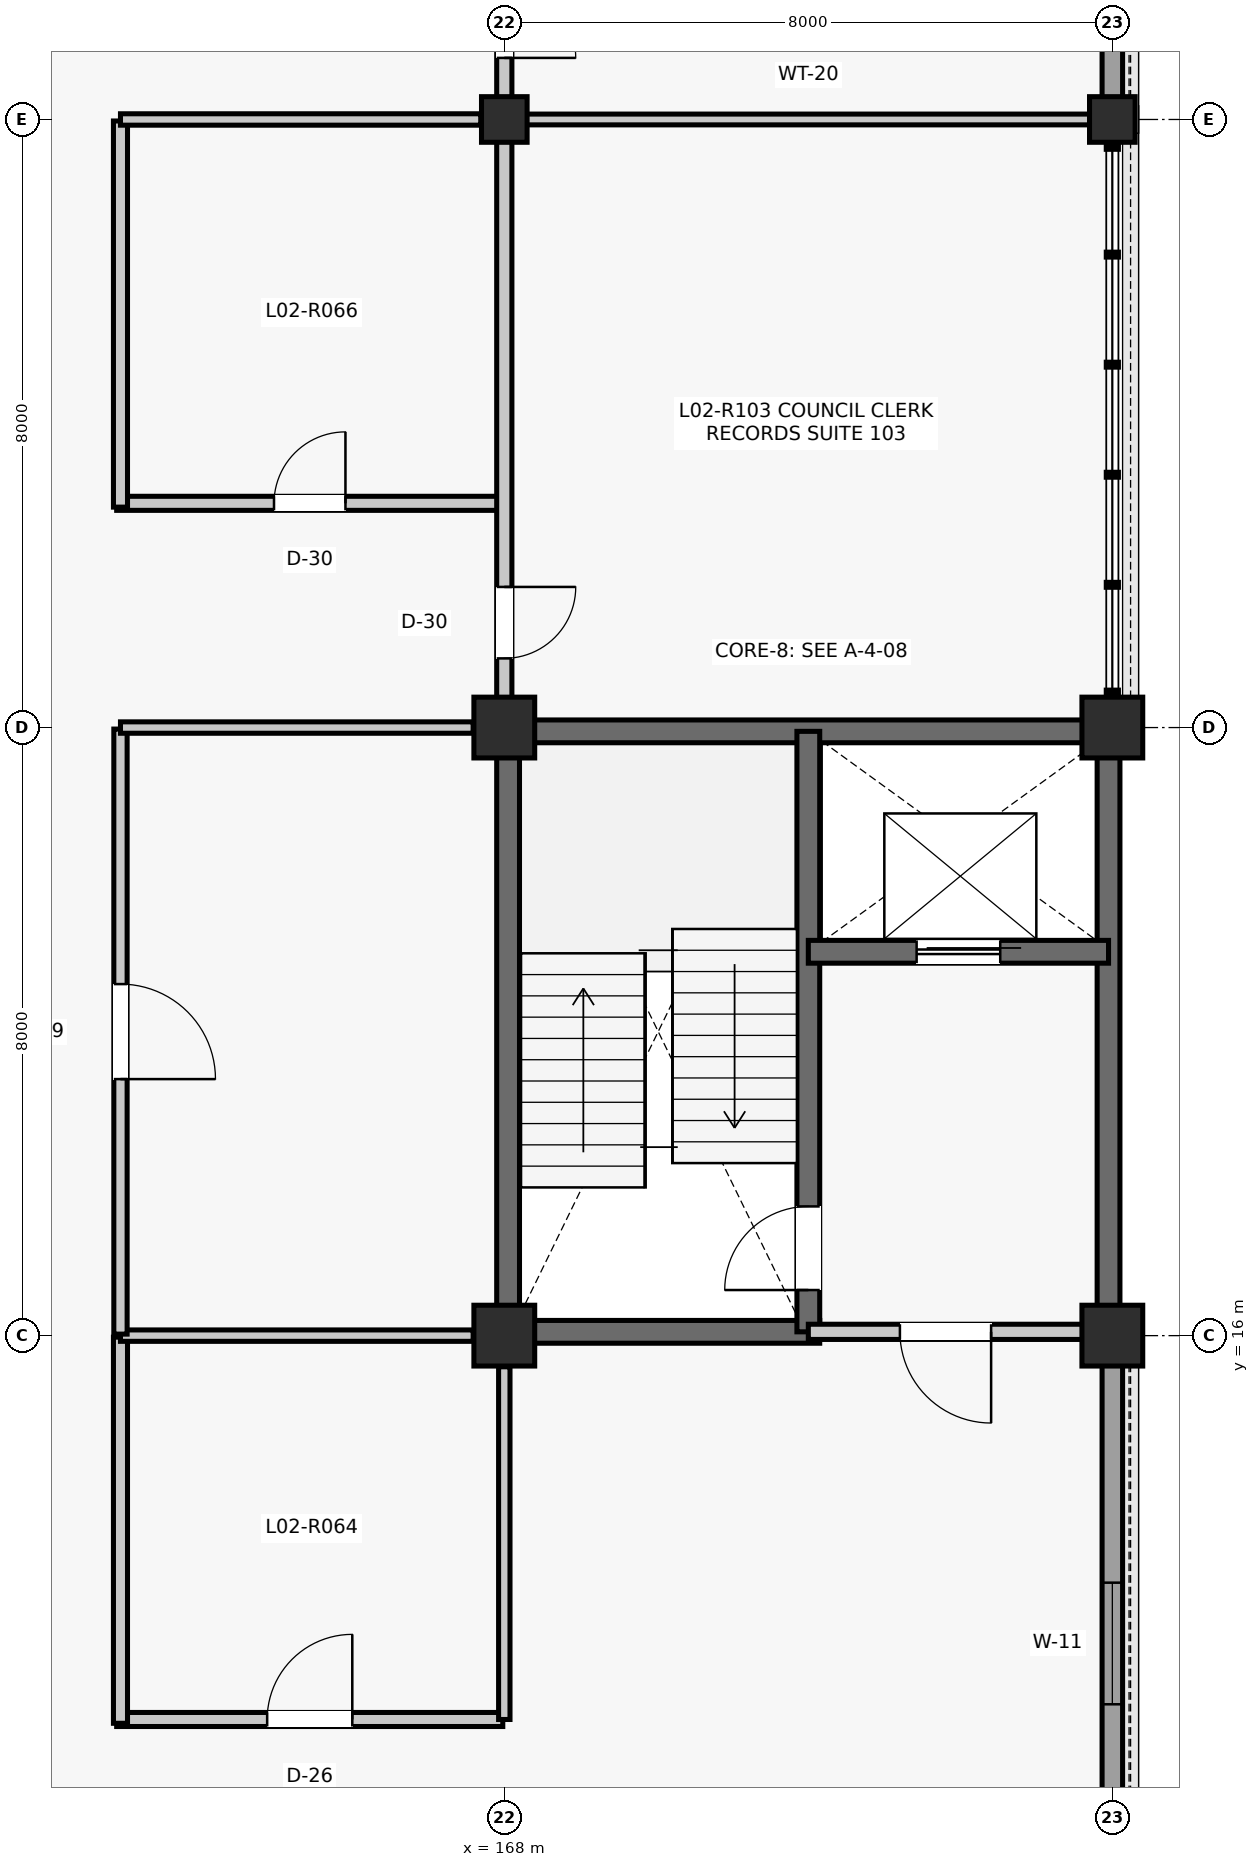
"""IFC4 building model, lengths in metres.
Left out: names, types, materials, properties, quantities, classifications, styles, units other than length and angle.
Written with IfcOpenShell. Run it as: python <this file> out.ifc"""

import sys

from ifc_helpers import new_model, si_unit, direction, frame, frame_2d, origin, origin_2d, place, context, subcontext, project, spatial, rectangle, extrude, element, fill, save


model = new_model("IFC4")
c1 = context("Model", 3, precision=1e-05, world=origin(), true_north=direction((0.0, 1.0)))
c2 = subcontext(c1, "Body", "Model", "MODEL_VIEW")
j1 = project(units=[si_unit("LENGTHUNIT", "METRE"), si_unit("PLANEANGLEUNIT", "RADIAN")], contexts=[c1])
p1 = place(None, origin())
s1 = spatial("IfcSite", under=j1, at=p1, CompositionType="ELEMENT")
p2 = place(p1, origin())
s2 = spatial("IfcBuilding", under=s1, at=p2, CompositionType="ELEMENT")
p3 = place(p2, frame((0.0, 0.0, 9.9)))
s3 = spatial("IfcBuildingStorey", under=s2, at=p3, CompositionType="ELEMENT", Elevation=9.9)
for number, where, z_axis, x_axis in (
    (1, (168.0, 16.0, 0.0), (0.0, 0.0, 1.0), (1.0, 0.0, 0.0)),
    (2, (168.0, 24.0, 0.0), (0.0, 0.0, 1.0), (1.0, 0.0, 0.0)),
):
    element("IfcColumn", number, at=place(p3, frame(where, z_axis=z_axis, x_axis=x_axis)), inside=s3, PredefinedType="COLUMN", context=c2, shape_type="SweptSolid", body=[
        extrude(rectangle(XDim=0.8, YDim=0.8, at=origin_2d()), origin(), (0.0, 0.0, 1.0), 3.96),
    ])
p4 = place(p3, frame((168.0, 32.0, 0.0), z_axis=(0.0, 0.0, 1.0), x_axis=(1.0, 0.0, 0.0)))
e3 = element("IfcColumn", 3, at=p4, inside=s3, PredefinedType="COLUMN", context=c2, shape_type="SweptSolid", body=[
    extrude(rectangle(XDim=0.6, YDim=0.6, at=origin_2d()), origin(), (0.0, 0.0, 1.0), 3.96),
])
for number, where, z_axis, x_axis in (
    (4, (176.0, 16.0, 0.0), (0.0, 0.0, 1.0), (1.0, 0.0, 0.0)),
    (5, (176.0, 24.0, 0.0), (0.0, 0.0, 1.0), (1.0, 0.0, 0.0)),
):
    element("IfcColumn", number, at=place(p3, frame(where, z_axis=z_axis, x_axis=x_axis)), inside=s3, PredefinedType="COLUMN", context=c2, shape_type="SweptSolid", body=[
        extrude(rectangle(XDim=0.8, YDim=0.8, at=origin_2d()), origin(), (0.0, 0.0, 1.0), 3.96),
    ])
p5 = place(p3, frame((176.0, 32.0, 0.0), z_axis=(0.0, 0.0, 1.0), x_axis=(1.0, 0.0, 0.0)))
e6 = element("IfcColumn", 6, at=p5, inside=s3, PredefinedType="COLUMN", context=c2, shape_type="SweptSolid", body=[
    extrude(rectangle(XDim=0.6, YDim=0.6, at=origin_2d()), origin(), (0.0, 0.0, 1.0), 3.96),
])
p6 = place(p3, frame((176.0, 8.285, 0.0), z_axis=(0.0, 0.0, 1.0), x_axis=(0.0, 1.0, 0.0)))
e7 = element("IfcWall", 7, at=p6, inside=s3, PredefinedType="SOLIDWALL", context=c2, shape_type="SweptSolid", body=[
    extrude(rectangle(XDim=7.33, YDim=0.27, at=frame_2d((3.665, 0.0))), origin(), (0.0, 0.0, 1.0), 3.344),
])
p7 = place(p6, frame((2.865, 0.0, 0.9)))
e8 = element("IfcOpeningElement", 8, at=p7, cuts=e7, PredefinedType="OPENING", context=c2, shape_type="SweptSolid", body=[
    extrude(rectangle(XDim=1.6, YDim=2.0, at=frame_2d((0.8, 1.0))), frame((0.0, 0.145, 0.0), z_axis=(0.0, -1.0, 0.0), x_axis=(1.0, 0.0, 0.0)), (0.0, 0.0, 1.0), 0.29),
])
p8 = place(p3, frame((176.0, 32.285, 0.0), z_axis=(0.0, 0.0, 1.0), x_axis=(0.0, 1.0, 0.0)))
e9 = element("IfcWall", 9, at=p8, inside=s3, PredefinedType="SOLIDWALL", context=c2, shape_type="SweptSolid", body=[
    extrude(rectangle(XDim=7.43, YDim=0.27, at=frame_2d((3.715, 0.0))), origin(), (0.0, 0.0, 1.0), 3.28),
])
p9 = place(p8, frame((3.115, 0.0, 0.9)))
e10 = element("IfcOpeningElement", 10, at=p9, cuts=e9, PredefinedType="OPENING", context=c2, shape_type="SweptSolid", body=[
    extrude(rectangle(XDim=1.2, YDim=1.8, at=frame_2d((0.6, 0.9))), frame((0.0, 0.145, 0.0), z_axis=(0.0, -1.0, 0.0), x_axis=(1.0, 0.0, 0.0)), (0.0, 0.0, 1.0), 0.29),
])
for number, where, z_axis, x_axis in (
    (11, (168.05, 16.29, 0.0), (0.0, 0.0, 1.0), (0.0, 1.0, 0.0)),
    (12, (168.29, 23.95, 0.0), (0.0, 0.0, 1.0), (1.0, 0.0, 0.0)),
    (13, (175.95, 16.29, 0.0), (0.0, 0.0, 1.0), (0.0, 1.0, 0.0)),
):
    element("IfcWall", number, at=place(p3, frame(where, z_axis=z_axis, x_axis=x_axis)), inside=s3, PredefinedType="SHEAR", context=c2, shape_type="SweptSolid", body=[
        extrude(rectangle(XDim=7.42, YDim=0.3, at=frame_2d((3.71, 0.0))), origin(), (0.0, 0.0, 1.0), 3.705),
    ])
p10 = place(p3, frame((168.29, 16.05, 0.0), z_axis=(0.0, 0.0, 1.0), x_axis=(1.0, 0.0, 0.0)))
e14 = element("IfcWall", 14, at=p10, inside=s3, PredefinedType="SHEAR", context=c2, shape_type="SweptSolid", body=[
    extrude(rectangle(XDim=3.86, YDim=0.3, at=frame_2d((1.93, 0.0))), origin(), (0.0, 0.0, 1.0), 3.705),
])
p11 = place(p3, frame((172.0, 16.05, 0.0), z_axis=(0.0, 0.0, 1.0), x_axis=(0.0, 1.0, 0.0)))
e15 = element("IfcWall", 15, at=p11, inside=s3, PredefinedType="SHEAR", context=c2, shape_type="SweptSolid", body=[
    extrude(rectangle(XDim=7.9, YDim=0.3, at=frame_2d((3.95, 0.0))), origin(), (0.0, 0.0, 1.0), 3.705),
])
p12 = place(p11, frame((0.55, 0.0, 0.0)))
e16 = element("IfcOpeningElement", 16, at=p12, cuts=e15, PredefinedType="OPENING", context=c2, shape_type="SweptSolid", body=[
    extrude(rectangle(XDim=1.1, YDim=2.15, at=frame_2d((0.55, 1.075))), frame((0.0, 0.16, 0.0), z_axis=(0.0, -1.0, 0.0), x_axis=(1.0, 0.0, 0.0)), (0.0, 0.0, 1.0), 0.32),
])
p13 = place(p3, frame((172.0, 21.05, 0.0), z_axis=(0.0, 0.0, 1.0), x_axis=(1.0, 0.0, 0.0)))
e17 = element("IfcWall", 17, at=p13, inside=s3, PredefinedType="SHEAR", context=c2, shape_type="SweptSolid", body=[
    extrude(rectangle(XDim=3.95, YDim=0.3, at=frame_2d((1.975, 0.0))), origin(), (0.0, 0.0, 1.0), 3.705),
])
p14 = place(p13, frame((1.425, 0.0, 0.0)))
e18 = element("IfcOpeningElement", 18, at=p14, cuts=e17, PredefinedType="OPENING", context=c2, shape_type="SweptSolid", body=[
    extrude(rectangle(XDim=1.1, YDim=2.2, at=frame_2d((0.55, 1.1))), frame((0.0, 0.16, 0.0), z_axis=(0.0, -1.0, 0.0), x_axis=(1.0, 0.0, 0.0)), (0.0, 0.0, 1.0), 0.32),
])
p15 = place(p3, frame((172.0, 16.05, 0.0), z_axis=(0.0, 0.0, 1.0), x_axis=(1.0, 0.0, 0.0)))
e19 = element("IfcWall", 19, at=p15, inside=s3, PredefinedType="PARTITIONING", context=c2, shape_type="SweptSolid", body=[
    extrude(rectangle(XDim=3.61, YDim=0.2, at=frame_2d((1.805, 0.0))), origin(), (0.0, 0.0, 1.0), 3.151),
])
p16 = place(p15, frame((1.205, 0.0, 0.0)))
e20 = element("IfcOpeningElement", 20, at=p16, cuts=e19, PredefinedType="OPENING", context=c2, shape_type="SweptSolid", body=[
    extrude(rectangle(XDim=1.2, YDim=2.15, at=frame_2d((0.6, 1.075))), frame((0.0, 0.11, 0.0), z_axis=(0.0, -1.0, 0.0), x_axis=(1.0, 0.0, 0.0)), (0.0, 0.0, 1.0), 0.22),
])
p17 = place(p3, frame((162.9, 10.95, 0.0), z_axis=(0.0, 0.0, 1.0), x_axis=(1.0, 0.0, 0.0)))
e21 = element("IfcWall", 21, at=p17, inside=s3, PredefinedType="PARTITIONING", context=c2, shape_type="SweptSolid", body=[
    extrude(rectangle(XDim=5.08, YDim=0.185, at=frame_2d((2.54, 0.0))), origin(), (0.0, 0.0, 1.0), 3.151),
])
p18 = place(p17, frame((1.98, 0.0, 0.0)))
e22 = element("IfcOpeningElement", 22, at=p18, cuts=e21, PredefinedType="OPENING", context=c2, shape_type="SweptSolid", body=[
    extrude(rectangle(XDim=1.12, YDim=2.22, at=frame_2d((0.56, 1.11))), frame((0.0, 0.103, 0.0), z_axis=(0.0, -1.0, 0.0), x_axis=(1.0, 0.0, 0.0)), (0.0, 0.0, 1.0), 0.205),
])
p19 = place(p3, frame((162.95, 10.9, 0.0), z_axis=(0.0, 0.0, 1.0), x_axis=(0.0, 1.0, 0.0)))
e23 = element("IfcWall", 23, at=p19, inside=s3, PredefinedType="PARTITIONING", context=c2, shape_type="SweptSolid", body=[
    extrude(rectangle(XDim=5.08, YDim=0.185, at=frame_2d((2.54, 0.0))), origin(), (0.0, 0.0, 1.0), 3.141),
])
p20 = place(p3, frame((162.95, 16.0, 0.0), z_axis=(0.0, 0.0, 1.0), x_axis=(1.0, 0.0, 0.0)))
e24 = element("IfcWall", 24, at=p20, inside=s3, PredefinedType="PARTITIONING", context=c2, shape_type="SweptSolid", body=[
    extrude(rectangle(XDim=4.64, YDim=0.15, at=frame_2d((2.32, 0.0))), origin(), (0.0, 0.0, 1.0), 3.141),
])
p21 = place(p3, frame((168.0, 10.95, 0.0), z_axis=(0.0, 0.0, 1.0), x_axis=(0.0, 1.0, 0.0)))
e25 = element("IfcWall", 25, at=p21, inside=s3, PredefinedType="PARTITIONING", context=c2, shape_type="SweptSolid", body=[
    extrude(rectangle(XDim=4.64, YDim=0.15, at=frame_2d((2.32, 0.0))), origin(), (0.0, 0.0, 1.0), 3.151),
])
p22 = place(p3, frame((162.95, 16.02, 0.0), z_axis=(0.0, 0.0, 1.0), x_axis=(0.0, 1.0, 0.0)))
e26 = element("IfcWall", 26, at=p22, inside=s3, PredefinedType="PARTITIONING", context=c2, shape_type="SweptSolid", body=[
    extrude(rectangle(XDim=7.96, YDim=0.175, at=frame_2d((3.98, 0.0))), origin(), (0.0, 0.0, 1.0), 3.141),
])
p23 = place(p22, frame((3.355, 0.0, 0.0)))
e27 = element("IfcOpeningElement", 27, at=p23, cuts=e26, PredefinedType="OPENING", context=c2, shape_type="SweptSolid", body=[
    extrude(rectangle(XDim=1.25, YDim=2.18, at=frame_2d((0.625, 1.09))), frame((0.0, 0.097, 0.0), z_axis=(0.0, -1.0, 0.0), x_axis=(1.0, 0.0, 0.0)), (0.0, 0.0, 1.0), 0.195),
])
p24 = place(p3, frame((162.95, 24.0, 0.0), z_axis=(0.0, 0.0, 1.0), x_axis=(1.0, 0.0, 0.0)))
e28 = element("IfcWall", 28, at=p24, inside=s3, PredefinedType="PARTITIONING", context=c2, shape_type="SweptSolid", body=[
    extrude(rectangle(XDim=4.64, YDim=0.15, at=frame_2d((2.32, 0.0))), origin(), (0.0, 0.0, 1.0), 3.151),
])
p25 = place(p3, frame((162.9, 26.95, 0.0), z_axis=(0.0, 0.0, 1.0), x_axis=(1.0, 0.0, 0.0)))
e29 = element("IfcWall", 29, at=p25, inside=s3, PredefinedType="PARTITIONING", context=c2, shape_type="SweptSolid", body=[
    extrude(rectangle(XDim=5.08, YDim=0.185, at=frame_2d((2.54, 0.0))), origin(), (0.0, 0.0, 1.0), 3.157),
])
p26 = place(p25, frame((2.07, 0.0, 0.0)))
e30 = element("IfcOpeningElement", 30, at=p26, cuts=e29, PredefinedType="OPENING", context=c2, shape_type="SweptSolid", body=[
    extrude(rectangle(XDim=0.94, YDim=2.12, at=frame_2d((0.47, 1.06))), frame((0.0, 0.103, 0.0), z_axis=(0.0, -1.0, 0.0), x_axis=(1.0, 0.0, 0.0)), (0.0, 0.0, 1.0), 0.205),
])
p27 = place(p3, frame((162.95, 26.9, 0.0), z_axis=(0.0, 0.0, 1.0), x_axis=(0.0, 1.0, 0.0)))
e31 = element("IfcWall", 31, at=p27, inside=s3, PredefinedType="PARTITIONING", context=c2, shape_type="SweptSolid", body=[
    extrude(rectangle(XDim=5.08, YDim=0.185, at=frame_2d((2.54, 0.0))), origin(), (0.0, 0.0, 1.0), 3.082),
])
p28 = place(p3, frame((162.95, 32.0, 0.0), z_axis=(0.0, 0.0, 1.0), x_axis=(1.0, 0.0, 0.0)))
e32 = element("IfcWall", 32, at=p28, inside=s3, PredefinedType="PARTITIONING", context=c2, shape_type="SweptSolid", body=[
    extrude(rectangle(XDim=4.74, YDim=0.15, at=frame_2d((2.37, 0.0))), origin(), (0.0, 0.0, 1.0), 3.082),
])
p29 = place(p3, frame((168.0, 24.39, 0.0), z_axis=(0.0, 0.0, 1.0), x_axis=(0.0, 1.0, 0.0)))
e33 = element("IfcWall", 33, at=p29, inside=s3, PredefinedType="PARTITIONING", context=c2, shape_type="SweptSolid", body=[
    extrude(rectangle(XDim=7.32, YDim=0.2, at=frame_2d((3.66, 0.0))), origin(), (0.0, 0.0, 1.0), 3.157),
])
p30 = place(p29, frame((0.52, 0.0, 0.0)))
e34 = element("IfcOpeningElement", 34, at=p30, cuts=e33, PredefinedType="OPENING", context=c2, shape_type="SweptSolid", body=[
    extrude(rectangle(XDim=0.94, YDim=2.12, at=frame_2d((0.47, 1.06))), frame((0.0, 0.11, 0.0), z_axis=(0.0, -1.0, 0.0), x_axis=(1.0, 0.0, 0.0)), (0.0, 0.0, 1.0), 0.22),
])
p31 = place(p3, frame((168.0, 32.29, 0.0), z_axis=(0.0, 0.0, 1.0), x_axis=(0.0, 1.0, 0.0)))
e35 = element("IfcWall", 35, at=p31, inside=s3, PredefinedType="PARTITIONING", context=c2, shape_type="SweptSolid", body=[
    extrude(rectangle(XDim=7.42, YDim=0.2, at=frame_2d((3.71, 0.0))), origin(), (0.0, 0.0, 1.0), 3.227),
])
p32 = place(p31, frame((0.52, 0.0, 0.0)))
e36 = element("IfcOpeningElement", 36, at=p32, cuts=e35, PredefinedType="OPENING", context=c2, shape_type="SweptSolid", body=[
    extrude(rectangle(XDim=0.94, YDim=2.12, at=frame_2d((0.47, 1.06))), frame((0.0, 0.11, 0.0), z_axis=(0.0, -1.0, 0.0), x_axis=(1.0, 0.0, 0.0)), (0.0, 0.0, 1.0), 0.22),
])
p33 = place(p3, frame((168.29, 32.0, 0.0), z_axis=(0.0, 0.0, 1.0), x_axis=(1.0, 0.0, 0.0)))
e37 = element("IfcWall", 37, at=p33, inside=s3, PredefinedType="PARTITIONING", context=c2, shape_type="SweptSolid", body=[
    extrude(rectangle(XDim=7.42, YDim=0.142, at=frame_2d((3.71, 0.0))), origin(), (0.0, 0.0, 1.0), 3.157),
])
p34 = place(p7, origin())
e38 = element("IfcWindow", 38, at=p34, inside=s3, PartitioningType="SINGLE_PANEL", PredefinedType="WINDOW", context=c2, shape_type="SweptSolid", body=[
    extrude(rectangle(XDim=1.6, YDim=2.0, at=frame_2d((0.8, 1.0))), frame((0.0, 0.03, 0.0), z_axis=(0.0, -1.0, 0.0), x_axis=(1.0, 0.0, 0.0)), (0.0, 0.0, 1.0), 0.06),
])
fill(e8, e38)
p35 = place(p12, origin())
e39 = element("IfcDoor", 39, at=p35, inside=s3, OperationType="SINGLE_SWING_LEFT", PredefinedType="DOOR", context=c2, shape_type="SweptSolid", body=[
    extrude(rectangle(XDim=1.1, YDim=2.15, at=frame_2d((0.55, 1.075))), frame((0.0, 0.025, 0.0), z_axis=(0.0, -1.0, 0.0), x_axis=(1.0, 0.0, 0.0)), (0.0, 0.0, 1.0), 0.05),
])
fill(e16, e39)
p36 = place(p14, origin())
e40 = element("IfcDoor", 40, at=p36, inside=s3, OperationType="SLIDING_TO_LEFT", PredefinedType="DOOR", context=c2, shape_type="SweptSolid", body=[
    extrude(rectangle(XDim=1.1, YDim=2.2, at=frame_2d((0.55, 1.1))), frame((0.0, 0.025, 0.0), z_axis=(0.0, -1.0, 0.0), x_axis=(1.0, 0.0, 0.0)), (0.0, 0.0, 1.0), 0.05),
])
fill(e18, e40)
p37 = place(p16, frame((1.2, 0.0, 0.0), z_axis=(0.0, 0.0, 1.0), x_axis=(-1.0, 0.0, 0.0)))
e41 = element("IfcDoor", 41, at=p37, inside=s3, OperationType="SINGLE_SWING_RIGHT", PredefinedType="DOOR", context=c2, shape_type="SweptSolid", body=[
    extrude(rectangle(XDim=1.2, YDim=2.15, at=frame_2d((0.6, 1.075))), frame((0.0, 0.025, 0.0), z_axis=(0.0, -1.0, 0.0), x_axis=(1.0, 0.0, 0.0)), (0.0, 0.0, 1.0), 0.05),
])
fill(e20, e41)
p38 = place(p18, origin())
e42 = element("IfcDoor", 42, at=p38, inside=s3, OperationType="SINGLE_SWING_RIGHT", PredefinedType="DOOR", context=c2, shape_type="SweptSolid", body=[
    extrude(rectangle(XDim=1.12, YDim=2.22, at=frame_2d((0.56, 1.11))), frame((0.0, 0.025, 0.0), z_axis=(0.0, -1.0, 0.0), x_axis=(1.0, 0.0, 0.0)), (0.0, 0.0, 1.0), 0.05),
])
fill(e22, e42)
p39 = place(p23, frame((1.25, 0.0, 0.0), z_axis=(0.0, 0.0, 1.0), x_axis=(-1.0, 0.0, 0.0)))
e43 = element("IfcDoor", 43, at=p39, inside=s3, OperationType="SINGLE_SWING_LEFT", PredefinedType="DOOR", context=c2, shape_type="SweptSolid", body=[
    extrude(rectangle(XDim=1.25, YDim=2.18, at=frame_2d((0.625, 1.09))), frame((0.0, 0.025, 0.0), z_axis=(0.0, -1.0, 0.0), x_axis=(1.0, 0.0, 0.0)), (0.0, 0.0, 1.0), 0.05),
])
fill(e27, e43)
p40 = place(p26, origin())
e44 = element("IfcDoor", 44, at=p40, inside=s3, OperationType="SINGLE_SWING_RIGHT", PredefinedType="DOOR", context=c2, shape_type="SweptSolid", body=[
    extrude(rectangle(XDim=0.94, YDim=2.12, at=frame_2d((0.47, 1.06))), frame((0.0, 0.025, 0.0), z_axis=(0.0, -1.0, 0.0), x_axis=(1.0, 0.0, 0.0)), (0.0, 0.0, 1.0), 0.05),
])
fill(e30, e44)
p41 = place(p30, frame((0.94, 0.0, 0.0), z_axis=(0.0, 0.0, 1.0), x_axis=(-1.0, 0.0, 0.0)))
e45 = element("IfcDoor", 45, at=p41, inside=s3, OperationType="SINGLE_SWING_RIGHT", PredefinedType="DOOR", context=c2, shape_type="SweptSolid", body=[
    extrude(rectangle(XDim=0.94, YDim=2.12, at=frame_2d((0.47, 1.06))), frame((0.0, 0.025, 0.0), z_axis=(0.0, -1.0, 0.0), x_axis=(1.0, 0.0, 0.0)), (0.0, 0.0, 1.0), 0.05),
])
fill(e34, e45)
p42 = place(p32, frame((0.94, 0.0, 0.0), z_axis=(0.0, 0.0, 1.0), x_axis=(-1.0, 0.0, 0.0)))
e46 = element("IfcDoor", 46, at=p42, inside=s3, OperationType="SINGLE_SWING_LEFT", PredefinedType="DOOR", context=c2, shape_type="SweptSolid", body=[
    extrude(rectangle(XDim=0.94, YDim=2.12, at=frame_2d((0.47, 1.06))), frame((0.0, 0.025, 0.0), z_axis=(0.0, -1.0, 0.0), x_axis=(1.0, 0.0, 0.0)), (0.0, 0.0, 1.0), 0.05),
])
fill(e36, e46)
save(model, sys.argv[1])
